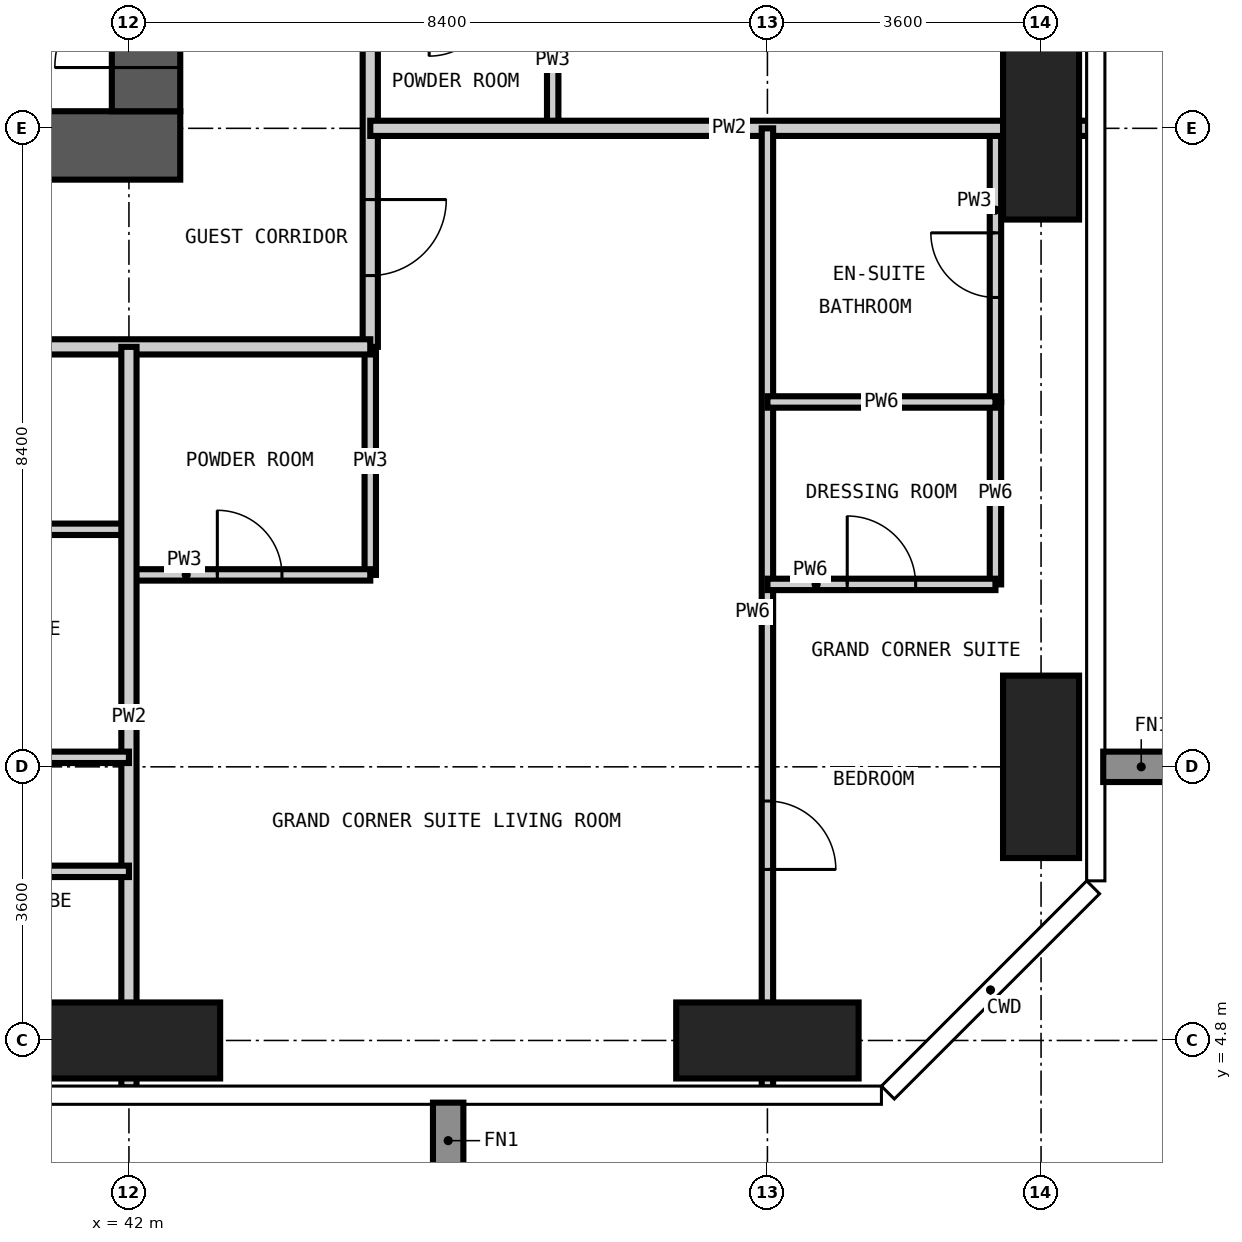
"""IFC4 building model, lengths in metres.
Left out: names, types, materials, properties, quantities, classifications, styles, units other than length and angle.
Written with IfcOpenShell. Run it as: python <this file> out.ifc"""

import sys

from ifc_helpers import new_model, si_unit, direction, frame, frame_2d, origin, origin_2d, place, context, subcontext, project, spatial, rectangle, extrude, element, fill, save


model = new_model("IFC4")
c1 = context("Model", 3, precision=1e-05, world=origin(), true_north=direction((0.0, 1.0)))
c2 = subcontext(c1, "Body", "Model", "MODEL_VIEW")
j1 = project(units=[si_unit("LENGTHUNIT", "METRE"), si_unit("PLANEANGLEUNIT", "RADIAN")], contexts=[c1])
p1 = place(None, origin())
s1 = spatial("IfcSite", under=j1, at=p1, CompositionType="ELEMENT")
p2 = place(p1, origin())
s2 = spatial("IfcBuilding", under=s1, at=p2, CompositionType="ELEMENT")
p3 = place(p2, frame((0.0, 0.0, 237.3)))
s3 = spatial("IfcBuildingStorey", under=s2, at=p3, CompositionType="ELEMENT", Elevation=237.3)
for number, where, z_axis, x_axis in (
    (1, (42.0, 4.8, -0.35), (0.0, 0.0, 1.0), (1.0, 0.0, 0.0)),
    (2, (50.4, 4.8, -0.35), (0.0, 0.0, 1.0), (1.0, 0.0, 0.0)),
):
    element("IfcColumn", number, at=place(p3, frame(where, z_axis=z_axis, x_axis=x_axis)), inside=s3, PredefinedType="COLUMN", context=c2, shape_type="SweptSolid", body=[
        extrude(rectangle(XDim=2.4, YDim=1.0, at=origin_2d()), origin(), (0.0, 0.0, 1.0), 3.9),
    ])
for number, where, z_axis, x_axis in (
    (3, (54.0, 8.4, -0.35), (0.0, 0.0, 1.0), (1.0, 0.0, 0.0)),
    (4, (54.0, 16.8, -0.35), (0.0, 0.0, 1.0), (1.0, 0.0, 0.0)),
):
    element("IfcColumn", number, at=place(p3, frame(where, z_axis=z_axis, x_axis=x_axis)), inside=s3, PredefinedType="COLUMN", context=c2, shape_type="SweptSolid", body=[
        extrude(rectangle(XDim=1.0, YDim=2.4, at=origin_2d()), origin(), (0.0, 0.0, 1.0), 3.9),
    ])
p4 = place(p3, frame((24.525, 16.575, -0.35), z_axis=(0.0, 0.0, 1.0), x_axis=(1.0, 0.0, 0.0)))
e5 = element("IfcWall", 5, at=p4, inside=s3, PredefinedType="SHEAR", context=c2, shape_type="SweptSolid", body=[
    extrude(rectangle(XDim=18.15, YDim=0.9, at=frame_2d((9.075, 0.0))), origin(), (0.0, 0.0, 1.0), 3.9),
])
p5 = place(p4, frame((4.375, 0.0, 0.35)))
e6 = element("IfcOpeningElement", 6, at=p5, cuts=e5, PredefinedType="OPENING", context=c2, shape_type="SweptSolid", body=[
    extrude(rectangle(XDim=1.0, YDim=2.1, at=frame_2d((0.5, 1.05))), frame((0.0, 0.46, 0.0), z_axis=(0.0, -1.0, 0.0), x_axis=(1.0, 0.0, 0.0)), (0.0, 0.0, 1.0), 0.92),
])
p6 = place(p4, frame((10.675, 0.0, 0.35)))
e7 = element("IfcOpeningElement", 7, at=p6, cuts=e5, PredefinedType="OPENING", context=c2, shape_type="SweptSolid", body=[
    extrude(rectangle(XDim=1.0, YDim=2.1, at=frame_2d((0.5, 1.05))), frame((0.0, 0.46, 0.0), z_axis=(0.0, -1.0, 0.0), x_axis=(1.0, 0.0, 0.0)), (0.0, 0.0, 1.0), 0.92),
])
p7 = place(p3, frame((42.225, 17.025, -0.35), z_axis=(0.0, 0.0, 1.0), x_axis=(0.0, 1.0, 0.0)))
e8 = element("IfcWall", 8, at=p7, inside=s3, PredefinedType="SHEAR", context=c2, shape_type="SweptSolid", body=[
    extrude(rectangle(XDim=24.75, YDim=0.9, at=frame_2d((12.375, 0.0))), origin(), (0.0, 0.0, 1.0), 3.9),
])
p8 = place(p7, frame((0.575, 0.0, 0.35)))
e9 = element("IfcOpeningElement", 9, at=p8, cuts=e8, PredefinedType="OPENING", context=c2, shape_type="SweptSolid", body=[
    extrude(rectangle(XDim=1.2, YDim=2.2, at=frame_2d((0.6, 1.1))), frame((0.0, 0.46, 0.0), z_axis=(0.0, -1.0, 0.0), x_axis=(1.0, 0.0, 0.0)), (0.0, 0.0, 1.0), 0.92),
])
p9 = place(p7, frame((11.475, 0.0, 0.35)))
e10 = element("IfcOpeningElement", 10, at=p9, cuts=e8, PredefinedType="OPENING", context=c2, shape_type="SweptSolid", body=[
    extrude(rectangle(XDim=1.8, YDim=2.2, at=frame_2d((0.9, 1.1))), frame((0.0, 0.46, 0.0), z_axis=(0.0, -1.0, 0.0), x_axis=(1.0, 0.0, 0.0)), (0.0, 0.0, 1.0), 0.92),
])
p10 = place(p7, frame((20.275, 0.0, 0.35)))
e11 = element("IfcOpeningElement", 11, at=p10, cuts=e8, PredefinedType="OPENING", context=c2, shape_type="SweptSolid", body=[
    extrude(rectangle(XDim=1.0, YDim=2.1, at=frame_2d((0.5, 1.05))), frame((0.0, 0.46, 0.0), z_axis=(0.0, -1.0, 0.0), x_axis=(1.0, 0.0, 0.0)), (0.0, 0.0, 1.0), 0.92),
])
p11 = place(p3, frame((45.175, 10.925, 0.0), z_axis=(0.0, 0.0, 1.0), x_axis=(0.0, 1.0, 0.0)))
e12 = element("IfcWall", 12, at=p11, inside=s3, PredefinedType="PARTITIONING", context=c2, shape_type="SweptSolid", body=[
    extrude(rectangle(XDim=3.0, YDim=0.15, at=frame_2d((1.5, 0.0))), origin(), (0.0, 0.0, 1.0), 3.55),
])
p12 = place(p3, frame((47.575, 16.8, 0.0), z_axis=(0.0, 0.0, 1.0), x_axis=(0.0, 1.0, 0.0)))
e13 = element("IfcWall", 13, at=p12, inside=s3, PredefinedType="PARTITIONING", context=c2, shape_type="SweptSolid", body=[
    extrude(rectangle(XDim=1.8, YDim=0.15, at=frame_2d((0.9, 0.0))), origin(), (0.0, 0.0, 1.0), 3.55),
])
p13 = place(p3, frame((53.4, 13.2, 0.0), z_axis=(0.0, 0.0, 1.0), x_axis=(0.0, 1.0, 0.0)))
e14 = element("IfcWall", 14, at=p13, inside=s3, PredefinedType="PARTITIONING", context=c2, shape_type="SweptSolid", body=[
    extrude(rectangle(XDim=3.6, YDim=0.15, at=frame_2d((1.8, 0.0))), origin(), (0.0, 0.0, 1.0), 3.55),
])
p14 = place(p13, frame((1.375, 0.0, 0.0)))
e15 = element("IfcOpeningElement", 15, at=p14, cuts=e14, PredefinedType="OPENING", context=c2, shape_type="SweptSolid", body=[
    extrude(rectangle(XDim=0.85, YDim=2.1, at=frame_2d((0.425, 1.05))), frame((0.0, 0.085, 0.0), z_axis=(0.0, -1.0, 0.0), x_axis=(1.0, 0.0, 0.0)), (0.0, 0.0, 1.0), 0.17),
])
p15 = place(p3, frame((42.0, 10.925, 0.0), z_axis=(0.0, 0.0, 1.0), x_axis=(1.0, 0.0, 0.0)))
e16 = element("IfcWall", 16, at=p15, inside=s3, PredefinedType="PARTITIONING", context=c2, shape_type="SweptSolid", body=[
    extrude(rectangle(XDim=3.175, YDim=0.15, at=frame_2d((1.587, 0.0))), origin(), (0.0, 0.0, 1.0), 3.55),
])
p16 = place(p15, frame((1.163, 0.0, 0.0)))
e17 = element("IfcOpeningElement", 17, at=p16, cuts=e16, PredefinedType="OPENING", context=c2, shape_type="SweptSolid", body=[
    extrude(rectangle(XDim=0.85, YDim=2.1, at=frame_2d((0.425, 1.05))), frame((0.0, 0.085, 0.0), z_axis=(0.0, -1.0, 0.0), x_axis=(1.0, 0.0, 0.0)), (0.0, 0.0, 1.0), 0.17),
])
p17 = place(p3, frame((39.0, 11.525, 0.0), z_axis=(0.0, 0.0, 1.0), x_axis=(1.0, 0.0, 0.0)))
e18 = element("IfcWall", 18, at=p17, inside=s3, PredefinedType="PARTITIONING", context=c2, shape_type="SweptSolid", body=[
    extrude(rectangle(XDim=3.0, YDim=0.15, at=frame_2d((1.5, 0.0))), origin(), (0.0, 0.0, 1.0), 3.55),
])
p18 = place(p17, frame((1.075, 0.0, 0.0)))
e19 = element("IfcOpeningElement", 19, at=p18, cuts=e18, PredefinedType="OPENING", context=c2, shape_type="SweptSolid", body=[
    extrude(rectangle(XDim=0.85, YDim=2.1, at=frame_2d((0.425, 1.05))), frame((0.0, 0.085, 0.0), z_axis=(0.0, -1.0, 0.0), x_axis=(1.0, 0.0, 0.0)), (0.0, 0.0, 1.0), 0.17),
])
p19 = place(p3, frame((45.175, 29.4, 0.0), z_axis=(0.0, 0.0, 1.0), x_axis=(0.0, -1.0, 0.0)))
e20 = element("IfcWall", 20, at=p19, inside=s3, PredefinedType="PARTITIONING", context=c2, shape_type="SweptSolid", body=[
    extrude(rectangle(XDim=15.475, YDim=0.2, at=frame_2d((7.737, 0.0))), origin(), (0.0, 0.0, 1.0), 3.55),
])
p20 = place(p19, frame((9.1, 0.0, 0.0)))
e21 = element("IfcOpeningElement", 21, at=p20, cuts=e20, PredefinedType="OPENING", context=c2, shape_type="SweptSolid", body=[
    extrude(rectangle(XDim=1.0, YDim=2.2, at=frame_2d((0.5, 1.1))), frame((0.0, 0.11, 0.0), z_axis=(0.0, -1.0, 0.0), x_axis=(1.0, 0.0, 0.0)), (0.0, 0.0, 1.0), 0.22),
])
p21 = place(p19, frame((13.537, 0.0, 0.0)))
e22 = element("IfcOpeningElement", 22, at=p21, cuts=e20, PredefinedType="OPENING", context=c2, shape_type="SweptSolid", body=[
    extrude(rectangle(XDim=1.0, YDim=2.2, at=frame_2d((0.5, 1.1))), frame((0.0, 0.11, 0.0), z_axis=(0.0, -1.0, 0.0), x_axis=(1.0, 0.0, 0.0)), (0.0, 0.0, 1.0), 0.22),
])
p22 = place(p3, frame((45.175, 13.925, 0.0), z_axis=(0.0, 0.0, 1.0), x_axis=(-1.0, 0.0, 0.0)))
e23 = element("IfcWall", 23, at=p22, inside=s3, PredefinedType="PARTITIONING", context=c2, shape_type="SweptSolid", body=[
    extrude(rectangle(XDim=22.85, YDim=0.2, at=frame_2d((11.425, 0.0))), origin(), (0.0, 0.0, 1.0), 3.55),
])
p23 = place(p22, frame((15.275, 0.0, 0.0)))
e24 = element("IfcOpeningElement", 24, at=p23, cuts=e23, PredefinedType="OPENING", context=c2, shape_type="SweptSolid", body=[
    extrude(rectangle(XDim=1.0, YDim=2.2, at=frame_2d((0.5, 1.1))), frame((0.0, 0.11, 0.0), z_axis=(0.0, -1.0, 0.0), x_axis=(1.0, 0.0, 0.0)), (0.0, 0.0, 1.0), 0.22),
])
p24 = place(p22, frame((6.875, 0.0, 0.0)))
e25 = element("IfcOpeningElement", 25, at=p24, cuts=e23, PredefinedType="OPENING", context=c2, shape_type="SweptSolid", body=[
    extrude(rectangle(XDim=1.0, YDim=2.2, at=frame_2d((0.5, 1.1))), frame((0.0, 0.11, 0.0), z_axis=(0.0, -1.0, 0.0), x_axis=(1.0, 0.0, 0.0)), (0.0, 0.0, 1.0), 0.22),
])
p25 = place(p3, frame((42.0, 4.182, 0.0), z_axis=(0.0, 0.0, 1.0), x_axis=(0.0, 1.0, 0.0)))
e26 = element("IfcWall", 26, at=p25, inside=s3, PredefinedType="PARTITIONING", context=c2, shape_type="SweptSolid", body=[
    extrude(rectangle(XDim=9.743, YDim=0.2, at=frame_2d((4.872, 0.0))), origin(), (0.0, 0.0, 1.0), 3.55),
])
p26 = place(p3, frame((45.175, 16.8, 0.0), z_axis=(0.0, 0.0, 1.0), x_axis=(1.0, 0.0, 0.0)))
e27 = element("IfcWall", 27, at=p26, inside=s3, PredefinedType="PARTITIONING", context=c2, shape_type="SweptSolid", body=[
    extrude(rectangle(XDim=9.443, YDim=0.2, at=frame_2d((4.721, 0.0))), origin(), (0.0, 0.0, 1.0), 3.55),
])
p27 = place(p3, frame((50.4, 4.182, 0.0), z_axis=(0.0, 0.0, 1.0), x_axis=(0.0, 1.0, 0.0)))
e28 = element("IfcWall", 28, at=p27, inside=s3, PredefinedType="PARTITIONING", context=c2, shape_type="SweptSolid", body=[
    extrude(rectangle(XDim=12.618, YDim=0.15, at=frame_2d((6.309, 0.0))), origin(), (0.0, 0.0, 1.0), 3.55),
])
p28 = place(p27, frame((2.868, 0.0, 0.0)))
e29 = element("IfcOpeningElement", 29, at=p28, cuts=e28, PredefinedType="OPENING", context=c2, shape_type="SweptSolid", body=[
    extrude(rectangle(XDim=0.9, YDim=2.1, at=frame_2d((0.45, 1.05))), frame((0.0, 0.085, 0.0), z_axis=(0.0, -1.0, 0.0), x_axis=(1.0, 0.0, 0.0)), (0.0, 0.0, 1.0), 0.17),
])
p29 = place(p3, frame((53.4, 10.8, 0.0), z_axis=(0.0, 0.0, 1.0), x_axis=(0.0, 1.0, 0.0)))
e30 = element("IfcWall", 30, at=p29, inside=s3, PredefinedType="PARTITIONING", context=c2, shape_type="SweptSolid", body=[
    extrude(rectangle(XDim=2.4, YDim=0.15, at=frame_2d((1.2, 0.0))), origin(), (0.0, 0.0, 1.0), 3.55),
])
p30 = place(p3, frame((39.0, 7.025, 0.0), z_axis=(0.0, 0.0, 1.0), x_axis=(1.0, 0.0, 0.0)))
e31 = element("IfcWall", 31, at=p30, inside=s3, PredefinedType="PARTITIONING", context=c2, shape_type="SweptSolid", body=[
    extrude(rectangle(XDim=3.0, YDim=0.15, at=frame_2d((1.5, 0.0))), origin(), (0.0, 0.0, 1.0), 3.55),
])
p31 = place(p30, frame((1.05, 0.0, 0.0)))
e32 = element("IfcOpeningElement", 32, at=p31, cuts=e31, PredefinedType="OPENING", context=c2, shape_type="SweptSolid", body=[
    extrude(rectangle(XDim=0.9, YDim=2.1, at=frame_2d((0.45, 1.05))), frame((0.0, 0.085, 0.0), z_axis=(0.0, -1.0, 0.0), x_axis=(1.0, 0.0, 0.0)), (0.0, 0.0, 1.0), 0.17),
])
p32 = place(p3, frame((39.0, 8.525, 0.0), z_axis=(0.0, 0.0, 1.0), x_axis=(1.0, 0.0, 0.0)))
e33 = element("IfcWall", 33, at=p32, inside=s3, PredefinedType="PARTITIONING", context=c2, shape_type="SweptSolid", body=[
    extrude(rectangle(XDim=3.0, YDim=0.15, at=frame_2d((1.5, 0.0))), origin(), (0.0, 0.0, 1.0), 3.55),
])
p33 = place(p3, frame((50.4, 10.8, 0.0), z_axis=(0.0, 0.0, 1.0), x_axis=(1.0, 0.0, 0.0)))
e34 = element("IfcWall", 34, at=p33, inside=s3, PredefinedType="PARTITIONING", context=c2, shape_type="SweptSolid", body=[
    extrude(rectangle(XDim=3.0, YDim=0.15, at=frame_2d((1.5, 0.0))), origin(), (0.0, 0.0, 1.0), 3.55),
])
p34 = place(p33, frame((1.05, 0.0, 0.0)))
e35 = element("IfcOpeningElement", 35, at=p34, cuts=e34, PredefinedType="OPENING", context=c2, shape_type="SweptSolid", body=[
    extrude(rectangle(XDim=0.9, YDim=2.1, at=frame_2d((0.45, 1.05))), frame((0.0, 0.085, 0.0), z_axis=(0.0, -1.0, 0.0), x_axis=(1.0, 0.0, 0.0)), (0.0, 0.0, 1.0), 0.17),
])
p35 = place(p3, frame((50.4, 13.2, 0.0), z_axis=(0.0, 0.0, 1.0), x_axis=(1.0, 0.0, 0.0)))
e36 = element("IfcWall", 36, at=p35, inside=s3, PredefinedType="PARTITIONING", context=c2, shape_type="SweptSolid", body=[
    extrude(rectangle(XDim=3.0, YDim=0.15, at=frame_2d((1.5, 0.0))), origin(), (0.0, 0.0, 1.0), 3.55),
])
p36 = place(p8, origin())
e37 = element("IfcDoor", 37, at=p36, inside=s3, OperationType="SINGLE_SWING_LEFT", PredefinedType="DOOR", context=c2, shape_type="SweptSolid", body=[
    extrude(rectangle(XDim=1.2, YDim=2.2, at=frame_2d((0.6, 1.1))), frame((0.0, 0.025, 0.0), z_axis=(0.0, -1.0, 0.0), x_axis=(1.0, 0.0, 0.0)), (0.0, 0.0, 1.0), 0.05),
])
fill(e9, e37)
p37 = place(p21, origin())
e38 = element("IfcDoor", 38, at=p37, inside=s3, OperationType="SINGLE_SWING_LEFT", PredefinedType="DOOR", context=c2, shape_type="SweptSolid", body=[
    extrude(rectangle(XDim=1.0, YDim=2.2, at=frame_2d((0.5, 1.1))), frame((0.0, 0.025, 0.0), z_axis=(0.0, -1.0, 0.0), x_axis=(1.0, 0.0, 0.0)), (0.0, 0.0, 1.0), 0.05),
])
fill(e22, e38)
p38 = place(p16, origin())
e39 = element("IfcDoor", 39, at=p38, inside=s3, OperationType="SINGLE_SWING_LEFT", PredefinedType="DOOR", context=c2, shape_type="SweptSolid", body=[
    extrude(rectangle(XDim=0.85, YDim=2.1, at=frame_2d((0.425, 1.05))), frame((0.0, 0.025, 0.0), z_axis=(0.0, -1.0, 0.0), x_axis=(1.0, 0.0, 0.0)), (0.0, 0.0, 1.0), 0.05),
])
fill(e17, e39)
p39 = place(p28, frame((0.9, 0.0, 0.0), z_axis=(0.0, 0.0, 1.0), x_axis=(-1.0, 0.0, 0.0)))
e40 = element("IfcDoor", 40, at=p39, inside=s3, OperationType="SINGLE_SWING_RIGHT", PredefinedType="DOOR", context=c2, shape_type="SweptSolid", body=[
    extrude(rectangle(XDim=0.9, YDim=2.1, at=frame_2d((0.45, 1.05))), frame((0.0, 0.025, 0.0), z_axis=(0.0, -1.0, 0.0), x_axis=(1.0, 0.0, 0.0)), (0.0, 0.0, 1.0), 0.05),
])
fill(e29, e40)
p40 = place(p14, origin())
e41 = element("IfcDoor", 41, at=p40, inside=s3, OperationType="SINGLE_SWING_RIGHT", PredefinedType="DOOR", context=c2, shape_type="SweptSolid", body=[
    extrude(rectangle(XDim=0.85, YDim=2.1, at=frame_2d((0.425, 1.05))), frame((0.0, 0.025, 0.0), z_axis=(0.0, -1.0, 0.0), x_axis=(1.0, 0.0, 0.0)), (0.0, 0.0, 1.0), 0.05),
])
fill(e15, e41)
p41 = place(p34, origin())
e42 = element("IfcDoor", 42, at=p41, inside=s3, OperationType="SINGLE_SWING_LEFT", PredefinedType="DOOR", context=c2, shape_type="SweptSolid", body=[
    extrude(rectangle(XDim=0.9, YDim=2.1, at=frame_2d((0.45, 1.05))), frame((0.0, 0.025, 0.0), z_axis=(0.0, -1.0, 0.0), x_axis=(1.0, 0.0, 0.0)), (0.0, 0.0, 1.0), 0.05),
])
fill(e35, e42)
save(model, sys.argv[1])
